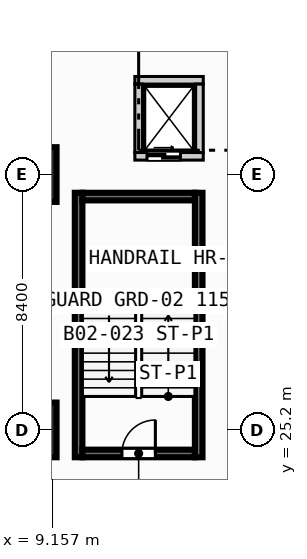
"""IFC4 building model, lengths in metres.
Left out: names, types, materials, properties, quantities, classifications, styles, units other than length and angle.
Written with IfcOpenShell. Run it as: python <this file> out.ifc"""

import sys

from ifc_helpers import new_model, si_unit, direction, frame, frame_2d, origin, origin_2d, place, context, subcontext, project, spatial, rectangle, extrude, element, fill, save


model = new_model("IFC4")
c1 = context("Model", 3, precision=1e-05, world=origin(), true_north=direction((0.0, 1.0)))
c2 = subcontext(c1, "Body", "Model", "MODEL_VIEW")
j1 = project(units=[si_unit("LENGTHUNIT", "METRE"), si_unit("PLANEANGLEUNIT", "RADIAN")], contexts=[c1])
p1 = place(None, origin())
s1 = spatial("IfcSite", under=j1, at=p1, CompositionType="ELEMENT")
p2 = place(p1, origin())
s2 = spatial("IfcBuilding", under=s1, at=p2, CompositionType="ELEMENT")
p3 = place(p2, frame((0.0, 0.0, -8.4)))
s3 = spatial("IfcBuildingStorey", under=s2, at=p3, CompositionType="ELEMENT", Elevation=-8.4)
for number, where, z_axis, x_axis in (
    (1, (10.025, 24.3, 0.0), (0.0, 0.0, 1.0), (0.0, 1.0, 0.0)),
    (2, (13.975, 24.3, 0.0), (0.0, 0.0, 1.0), (0.0, 1.0, 0.0)),
):
    element("IfcWall", number, at=place(p3, frame(where, z_axis=z_axis, x_axis=x_axis)), inside=s3, PredefinedType="SOLIDWALL", context=c2, shape_type="SweptSolid", body=[
        extrude(rectangle(XDim=8.7, YDim=0.25, at=frame_2d((4.35, 0.0))), origin(), (0.0, 0.0, 1.0), 3.85),
    ])
p4 = place(p3, frame((10.15, 32.875, 0.0), z_axis=(0.0, 0.0, 1.0), x_axis=(1.0, 0.0, 0.0)))
e3 = element("IfcWall", 3, at=p4, inside=s3, PredefinedType="SOLIDWALL", context=c2, shape_type="SweptSolid", body=[
    extrude(rectangle(XDim=3.7, YDim=0.25, at=frame_2d((1.85, 0.0))), origin(), (0.0, 0.0, 1.0), 3.85),
])
for number, where, z_axis, x_axis in (
    (4, (8.4, 25.2, 0.0), (0.0, 0.0, 1.0), (1.0, 0.0, 0.0)),
    (5, (8.4, 33.6, 0.0), (0.0, 0.0, 1.0), (1.0, 0.0, 0.0)),
):
    element("IfcColumn", number, at=place(p3, frame(where, z_axis=z_axis, x_axis=x_axis)), inside=s3, PredefinedType="COLUMN", context=c2, shape_type="SweptSolid", body=[
        extrude(rectangle(XDim=1.8, YDim=1.8, at=origin_2d()), origin(), (0.0, 0.0, 1.0), 4.2),
    ])
p5 = place(p3, frame((11.875, 34.2, 0.0), z_axis=(0.0, 0.0, 1.0), x_axis=(1.0, 0.0, 0.0)))
e6 = element("IfcWall", 6, at=p5, inside=s3, PredefinedType="SOLIDWALL", context=c2, shape_type="SweptSolid", body=[
    extrude(rectangle(XDim=2.25, YDim=0.25, at=frame_2d((1.125, 0.0))), origin(), (0.0, 0.0, 1.0), 3.85),
])
p6 = place(p5, frame((0.4, 0.0, 0.0)))
e7 = element("IfcOpeningElement", 7, at=p6, cuts=e6, PredefinedType="OPENING", context=c2, shape_type="SweptSolid", body=[
    extrude(rectangle(XDim=1.1, YDim=2.15, at=frame_2d((0.55, 1.075))), frame((0.0, 0.135, 0.0), z_axis=(0.0, -1.0, 0.0), x_axis=(1.0, 0.0, 0.0)), (0.0, 0.0, 1.0), 0.27),
])
for number, where, z_axis, x_axis in (
    (8, (11.875, 36.7, 0.0), (0.0, 0.0, 1.0), (1.0, 0.0, 0.0)),
    (9, (12.0, 34.325, 0.0), (0.0, 0.0, 1.0), (0.0, 1.0, 0.0)),
    (10, (14.0, 34.325, 0.0), (0.0, 0.0, 1.0), (0.0, 1.0, 0.0)),
):
    element("IfcWall", number, at=place(p3, frame(where, z_axis=z_axis, x_axis=x_axis)), inside=s3, PredefinedType="SOLIDWALL", context=c2, shape_type="SweptSolid", body=[
        extrude(rectangle(XDim=2.25, YDim=0.25, at=frame_2d((1.125, 0.0))), origin(), (0.0, 0.0, 1.0), 3.85),
    ])
p7 = place(p3, frame((10.15, 24.425, 0.0), z_axis=(0.0, 0.0, 1.0), x_axis=(1.0, 0.0, 0.0)))
e11 = element("IfcWall", 11, at=p7, inside=s3, PredefinedType="SOLIDWALL", context=c2, shape_type="SweptSolid", body=[
    extrude(rectangle(XDim=3.7, YDim=0.25, at=frame_2d((1.85, 0.0))), origin(), (0.0, 0.0, 1.0), 3.85),
])
p8 = place(p7, frame((1.3, 0.0, 0.0)))
e12 = element("IfcOpeningElement", 12, at=p8, cuts=e11, PredefinedType="OPENING", context=c2, shape_type="SweptSolid", body=[
    extrude(rectangle(XDim=1.1, YDim=2.15, at=frame_2d((0.55, 1.075))), frame((0.0, 0.135, 0.0), z_axis=(0.0, -1.0, 0.0), x_axis=(1.0, 0.0, 0.0)), (0.0, 0.0, 1.0), 0.27),
])
p9 = place(p6, origin())
e13 = element("IfcDoor", 13, at=p9, inside=s3, OperationType="SLIDING_TO_LEFT", PredefinedType="DOOR", context=c2, shape_type="SweptSolid", body=[
    extrude(rectangle(XDim=1.1, YDim=2.15, at=frame_2d((0.55, 1.075))), frame((0.0, 0.025, 0.0), z_axis=(0.0, -1.0, 0.0), x_axis=(1.0, 0.0, 0.0)), (0.0, 0.0, 1.0), 0.05),
])
fill(e7, e13)
p10 = place(p8, origin())
e14 = element("IfcDoor", 14, at=p10, inside=s3, OperationType="SINGLE_SWING_RIGHT", PredefinedType="DOOR", context=c2, shape_type="SweptSolid", body=[
    extrude(rectangle(XDim=1.1, YDim=2.15, at=frame_2d((0.55, 1.075))), frame((0.0, 0.025, 0.0), z_axis=(0.0, -1.0, 0.0), x_axis=(1.0, 0.0, 0.0)), (0.0, 0.0, 1.0), 0.05),
])
fill(e12, e14)
save(model, sys.argv[1])
